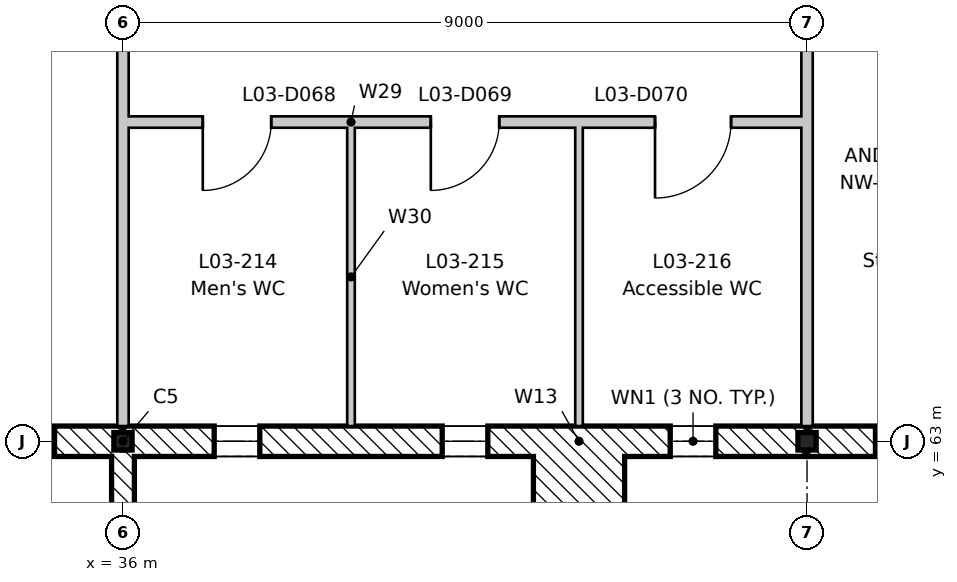
"""IFC4 building model, lengths in metres.
Left out: names, types, materials, properties, quantities, classifications, styles, units other than length and angle.
Written with IfcOpenShell. Run it as: python <this file> out.ifc"""

import sys

from ifc_helpers import new_model, si_unit, direction, frame, frame_2d, origin, origin_2d, place, context, subcontext, project, spatial, rectangle, i_section, extrude, element, fill, save


model = new_model("IFC4")
c1 = context("Model", 3, precision=1e-05, world=origin(), true_north=direction((0.0, 1.0)))
c2 = subcontext(c1, "Body", "Model", "MODEL_VIEW")
j1 = project(units=[si_unit("LENGTHUNIT", "METRE"), si_unit("PLANEANGLEUNIT", "RADIAN")], contexts=[c1])
p1 = place(None, origin())
s1 = spatial("IfcSite", under=j1, at=p1, CompositionType="ELEMENT")
p2 = place(p1, origin())
s2 = spatial("IfcBuilding", under=s1, at=p2, CompositionType="ELEMENT")
p3 = place(p2, frame((0.0, 0.0, 14.4)))
s3 = spatial("IfcBuildingStorey", under=s2, at=p3, CompositionType="ELEMENT", Elevation=14.4)
for number, where, z_axis, x_axis in (
    (1, (36.0, 63.0, -0.2), (0.0, 0.0, 1.0), (1.0, 0.0, 0.0)),
    (2, (45.0, 63.0, -0.2), (0.0, 0.0, 1.0), (1.0, 0.0, 0.0)),
):
    element("IfcColumn", number, at=place(p3, frame(where, z_axis=z_axis, x_axis=x_axis)), inside=s3, PredefinedType="COLUMN", context=c2, shape_type="SweptSolid", body=[
        extrude(i_section(OverallWidth=0.24, OverallDepth=0.23, WebThickness=0.008, FlangeThickness=0.012, FilletRadius=0.021, at=origin_2d()), origin(), (0.0, 0.0, 1.0), 4.2),
    ])
p4 = place(p3, frame((35.991, 63.0, 0.0), z_axis=(0.0, 0.0, 1.0), x_axis=(-1.0, 0.0, 0.0)))
e3 = element("IfcWall", 3, at=p4, inside=s3, PredefinedType="STANDARD", context=c2, shape_type="SweptSolid", body=[
    extrude(rectangle(XDim=8.982, YDim=0.4, at=frame_2d((4.491, 0.0))), origin(), (0.0, 0.0, 1.0), 3.6),
])
p5 = place(p4, frame((3.591, 0.0, 0.0)))
e4 = element("IfcOpeningElement", 4, at=p5, cuts=e3, PredefinedType="OPENING", context=c2, shape_type="SweptSolid", body=[
    extrude(rectangle(XDim=1.8, YDim=2.4, at=frame_2d((0.9, 1.2))), frame((0.0, 0.21, 0.0), z_axis=(0.0, -1.0, 0.0), x_axis=(1.0, 0.0, 0.0)), (0.0, 0.0, 1.0), 0.42),
])
p6 = place(p4, frame((6.891, 0.0, 0.9)))
e5 = element("IfcOpeningElement", 5, at=p6, cuts=e3, PredefinedType="OPENING", context=c2, shape_type="SweptSolid", body=[
    extrude(rectangle(XDim=1.2, YDim=2.4, at=frame_2d((0.6, 1.2))), frame((0.0, 0.21, 0.0), z_axis=(0.0, -1.0, 0.0), x_axis=(1.0, 0.0, 0.0)), (0.0, 0.0, 1.0), 0.42),
])
p7 = place(p4, frame((0.891, 0.0, 0.9)))
e6 = element("IfcOpeningElement", 6, at=p7, cuts=e3, PredefinedType="OPENING", context=c2, shape_type="SweptSolid", body=[
    extrude(rectangle(XDim=1.2, YDim=2.4, at=frame_2d((0.6, 1.2))), frame((0.0, 0.21, 0.0), z_axis=(0.0, -1.0, 0.0), x_axis=(1.0, 0.0, 0.0)), (0.0, 0.0, 1.0), 0.42),
])
p8 = place(p3, frame((44.991, 63.0, 0.0), z_axis=(0.0, 0.0, 1.0), x_axis=(-1.0, 0.0, 0.0)))
e7 = element("IfcWall", 7, at=p8, inside=s3, PredefinedType="STANDARD", context=c2, shape_type="SweptSolid", body=[
    extrude(rectangle(XDim=8.982, YDim=0.4, at=frame_2d((4.491, 0.0))), origin(), (0.0, 0.0, 1.0), 3.6),
])
p9 = place(p8, frame((7.191, 0.0, 1.5)))
e8 = element("IfcOpeningElement", 8, at=p9, cuts=e7, PredefinedType="OPENING", context=c2, shape_type="SweptSolid", body=[
    extrude(rectangle(XDim=0.6, YDim=1.2, at=frame_2d((0.3, 0.6))), frame((0.0, 0.21, 0.0), z_axis=(0.0, -1.0, 0.0), x_axis=(1.0, 0.0, 0.0)), (0.0, 0.0, 1.0), 0.42),
])
p10 = place(p8, frame((4.191, 0.0, 1.5)))
e9 = element("IfcOpeningElement", 9, at=p10, cuts=e7, PredefinedType="OPENING", context=c2, shape_type="SweptSolid", body=[
    extrude(rectangle(XDim=0.6, YDim=1.2, at=frame_2d((0.3, 0.6))), frame((0.0, 0.21, 0.0), z_axis=(0.0, -1.0, 0.0), x_axis=(1.0, 0.0, 0.0)), (0.0, 0.0, 1.0), 0.42),
])
p11 = place(p8, frame((1.191, 0.0, 1.5)))
e10 = element("IfcOpeningElement", 10, at=p11, cuts=e7, PredefinedType="OPENING", context=c2, shape_type="SweptSolid", body=[
    extrude(rectangle(XDim=0.6, YDim=1.2, at=frame_2d((0.3, 0.6))), frame((0.0, 0.21, 0.0), z_axis=(0.0, -1.0, 0.0), x_axis=(1.0, 0.0, 0.0)), (0.0, 0.0, 1.0), 0.42),
])
p12 = place(p3, frame((53.991, 63.0, 0.0), z_axis=(0.0, 0.0, 1.0), x_axis=(-1.0, 0.0, 0.0)))
e11 = element("IfcWall", 11, at=p12, inside=s3, PredefinedType="STANDARD", context=c2, shape_type="SweptSolid", body=[
    extrude(rectangle(XDim=8.982, YDim=0.4, at=frame_2d((4.491, 0.0))), origin(), (0.0, 0.0, 1.0), 3.6),
])
p13 = place(p12, frame((6.891, 0.0, 0.9)))
e12 = element("IfcOpeningElement", 12, at=p13, cuts=e11, PredefinedType="OPENING", context=c2, shape_type="SweptSolid", body=[
    extrude(rectangle(XDim=1.2, YDim=2.4, at=frame_2d((0.6, 1.2))), frame((0.0, 0.21, 0.0), z_axis=(0.0, -1.0, 0.0), x_axis=(1.0, 0.0, 0.0)), (0.0, 0.0, 1.0), 0.42),
])
p14 = place(p12, frame((3.891, 0.0, 0.9)))
e13 = element("IfcOpeningElement", 13, at=p14, cuts=e11, PredefinedType="OPENING", context=c2, shape_type="SweptSolid", body=[
    extrude(rectangle(XDim=1.2, YDim=2.5, at=frame_2d((0.6, 1.25))), frame((0.0, 0.21, 0.0), z_axis=(0.0, -1.0, 0.0), x_axis=(1.0, 0.0, 0.0)), (0.0, 0.0, 1.0), 0.42),
])
p15 = place(p3, frame((41.4, 62.2, 0.0), z_axis=(0.0, 0.0, 1.0), x_axis=(1.0, 0.0, 0.0)))
e14 = element("IfcWall", 14, at=p15, inside=s3, PredefinedType="STANDARD", context=c2, shape_type="SweptSolid", body=[
    extrude(rectangle(XDim=1.2, YDim=1.2, at=frame_2d((0.6, 0.0))), origin(), (0.0, 0.0, 1.0), 4.2),
])
p16 = place(p3, frame((36.0, 62.885, 0.0), z_axis=(0.0, 0.0, 1.0), x_axis=(0.0, -1.0, 0.0)))
e15 = element("IfcWall", 15, at=p16, inside=s3, PredefinedType="STANDARD", context=c2, shape_type="SweptSolid", body=[
    extrude(rectangle(XDim=2.285, YDim=0.3, at=frame_2d((1.143, 0.0))), origin(), (0.0, 0.0, 1.0), 3.67),
])
for number, where, z_axis, x_axis in (
    (16, (36.0, 63.2, 0.0), (0.0, 0.0, 1.0), (0.0, 1.0, 0.0)),
    (17, (45.0, 63.2, 0.0), (0.0, 0.0, 1.0), (0.0, 1.0, 0.0)),
):
    element("IfcWall", number, at=place(p3, frame(where, z_axis=z_axis, x_axis=x_axis)), inside=s3, PredefinedType="PARTITIONING", context=c2, shape_type="SweptSolid", body=[
        extrude(rectangle(XDim=7.225, YDim=0.15, at=frame_2d((3.613, 0.0))), origin(), (0.0, 0.0, 1.0), 3.65),
    ])
p17 = place(p3, frame((36.075, 67.2, 0.0), z_axis=(0.0, 0.0, 1.0), x_axis=(1.0, 0.0, 0.0)))
e18 = element("IfcWall", 18, at=p17, inside=s3, PredefinedType="PARTITIONING", context=c2, shape_type="SweptSolid", body=[
    extrude(rectangle(XDim=8.85, YDim=0.15, at=frame_2d((4.425, 0.0))), origin(), (0.0, 0.0, 1.0), 4.0),
])
p18 = place(p17, frame((0.975, 0.0, 0.0)))
e19 = element("IfcOpeningElement", 19, at=p18, cuts=e18, PredefinedType="OPENING", context=c2, shape_type="SweptSolid", body=[
    extrude(rectangle(XDim=0.9, YDim=2.1, at=frame_2d((0.45, 1.05))), frame((0.0, 0.085, 0.0), z_axis=(0.0, -1.0, 0.0), x_axis=(1.0, 0.0, 0.0)), (0.0, 0.0, 1.0), 0.17),
])
p19 = place(p17, frame((3.975, 0.0, 0.0)))
e20 = element("IfcOpeningElement", 20, at=p19, cuts=e18, PredefinedType="OPENING", context=c2, shape_type="SweptSolid", body=[
    extrude(rectangle(XDim=0.9, YDim=2.1, at=frame_2d((0.45, 1.05))), frame((0.0, 0.085, 0.0), z_axis=(0.0, -1.0, 0.0), x_axis=(1.0, 0.0, 0.0)), (0.0, 0.0, 1.0), 0.17),
])
p20 = place(p17, frame((6.925, 0.0, 0.0)))
e21 = element("IfcOpeningElement", 21, at=p20, cuts=e18, PredefinedType="OPENING", context=c2, shape_type="SweptSolid", body=[
    extrude(rectangle(XDim=1.0, YDim=2.1, at=frame_2d((0.5, 1.05))), frame((0.0, 0.085, 0.0), z_axis=(0.0, -1.0, 0.0), x_axis=(1.0, 0.0, 0.0)), (0.0, 0.0, 1.0), 0.17),
])
for number, where, z_axis, x_axis in (
    (22, (39.0, 63.2, 0.0), (0.0, 0.0, 1.0), (0.0, 1.0, 0.0)),
    (23, (42.0, 63.2, 0.0), (0.0, 0.0, 1.0), (0.0, 1.0, 0.0)),
):
    element("IfcWall", number, at=place(p3, frame(where, z_axis=z_axis, x_axis=x_axis)), inside=s3, PredefinedType="PARTITIONING", context=c2, shape_type="SweptSolid", body=[
        extrude(rectangle(XDim=3.925, YDim=0.1, at=frame_2d((1.962, 0.0))), origin(), (0.0, 0.0, 1.0), 4.0),
    ])
p21 = place(p7, origin())
e24 = element("IfcWindow", 24, at=p21, inside=s3, PartitioningType="SINGLE_PANEL", PredefinedType="WINDOW", context=c2, shape_type="SweptSolid", body=[
    extrude(rectangle(XDim=1.2, YDim=2.4, at=frame_2d((0.6, 1.2))), frame((0.0, -0.12, 0.0), z_axis=(0.0, -1.0, 0.0), x_axis=(1.0, 0.0, 0.0)), (0.0, 0.0, 1.0), 0.06),
])
fill(e6, e24)
p22 = place(p9, origin())
e25 = element("IfcWindow", 25, at=p22, inside=s3, PartitioningType="SINGLE_PANEL", PredefinedType="WINDOW", context=c2, shape_type="SweptSolid", body=[
    extrude(rectangle(XDim=0.6, YDim=1.2, at=frame_2d((0.3, 0.6))), frame((0.0, -0.12, 0.0), z_axis=(0.0, -1.0, 0.0), x_axis=(1.0, 0.0, 0.0)), (0.0, 0.0, 1.0), 0.06),
])
fill(e8, e25)
p23 = place(p10, origin())
e26 = element("IfcWindow", 26, at=p23, inside=s3, PartitioningType="SINGLE_PANEL", PredefinedType="WINDOW", context=c2, shape_type="SweptSolid", body=[
    extrude(rectangle(XDim=0.6, YDim=1.2, at=frame_2d((0.3, 0.6))), frame((0.0, -0.12, 0.0), z_axis=(0.0, -1.0, 0.0), x_axis=(1.0, 0.0, 0.0)), (0.0, 0.0, 1.0), 0.06),
])
fill(e9, e26)
p24 = place(p11, origin())
e27 = element("IfcWindow", 27, at=p24, inside=s3, PartitioningType="SINGLE_PANEL", PredefinedType="WINDOW", context=c2, shape_type="SweptSolid", body=[
    extrude(rectangle(XDim=0.6, YDim=1.2, at=frame_2d((0.3, 0.6))), frame((0.0, -0.12, 0.0), z_axis=(0.0, -1.0, 0.0), x_axis=(1.0, 0.0, 0.0)), (0.0, 0.0, 1.0), 0.06),
])
fill(e10, e27)
p25 = place(p13, origin())
e28 = element("IfcWindow", 28, at=p25, inside=s3, PartitioningType="SINGLE_PANEL", PredefinedType="WINDOW", context=c2, shape_type="SweptSolid", body=[
    extrude(rectangle(XDim=1.2, YDim=2.4, at=frame_2d((0.6, 1.2))), frame((0.0, -0.12, 0.0), z_axis=(0.0, -1.0, 0.0), x_axis=(1.0, 0.0, 0.0)), (0.0, 0.0, 1.0), 0.06),
])
fill(e12, e28)
p26 = place(p18, frame((0.9, 0.0, 0.0), z_axis=(0.0, 0.0, 1.0), x_axis=(-1.0, 0.0, 0.0)))
e29 = element("IfcDoor", 29, at=p26, inside=s3, OperationType="SINGLE_SWING_RIGHT", PredefinedType="DOOR", context=c2, shape_type="SweptSolid", body=[
    extrude(rectangle(XDim=0.9, YDim=2.1, at=frame_2d((0.45, 1.05))), frame((0.0, 0.025, 0.0), z_axis=(0.0, -1.0, 0.0), x_axis=(1.0, 0.0, 0.0)), (0.0, 0.0, 1.0), 0.05),
])
fill(e19, e29)
p27 = place(p19, frame((0.9, 0.0, 0.0), z_axis=(0.0, 0.0, 1.0), x_axis=(-1.0, 0.0, 0.0)))
e30 = element("IfcDoor", 30, at=p27, inside=s3, OperationType="SINGLE_SWING_RIGHT", PredefinedType="DOOR", context=c2, shape_type="SweptSolid", body=[
    extrude(rectangle(XDim=0.9, YDim=2.1, at=frame_2d((0.45, 1.05))), frame((0.0, 0.025, 0.0), z_axis=(0.0, -1.0, 0.0), x_axis=(1.0, 0.0, 0.0)), (0.0, 0.0, 1.0), 0.05),
])
fill(e20, e30)
p28 = place(p20, frame((1.0, 0.0, 0.0), z_axis=(0.0, 0.0, 1.0), x_axis=(-1.0, 0.0, 0.0)))
e31 = element("IfcDoor", 31, at=p28, inside=s3, OperationType="SINGLE_SWING_RIGHT", PredefinedType="DOOR", context=c2, shape_type="SweptSolid", body=[
    extrude(rectangle(XDim=1.0, YDim=2.1, at=frame_2d((0.5, 1.05))), frame((0.0, 0.025, 0.0), z_axis=(0.0, -1.0, 0.0), x_axis=(1.0, 0.0, 0.0)), (0.0, 0.0, 1.0), 0.05),
])
fill(e21, e31)
save(model, sys.argv[1])
